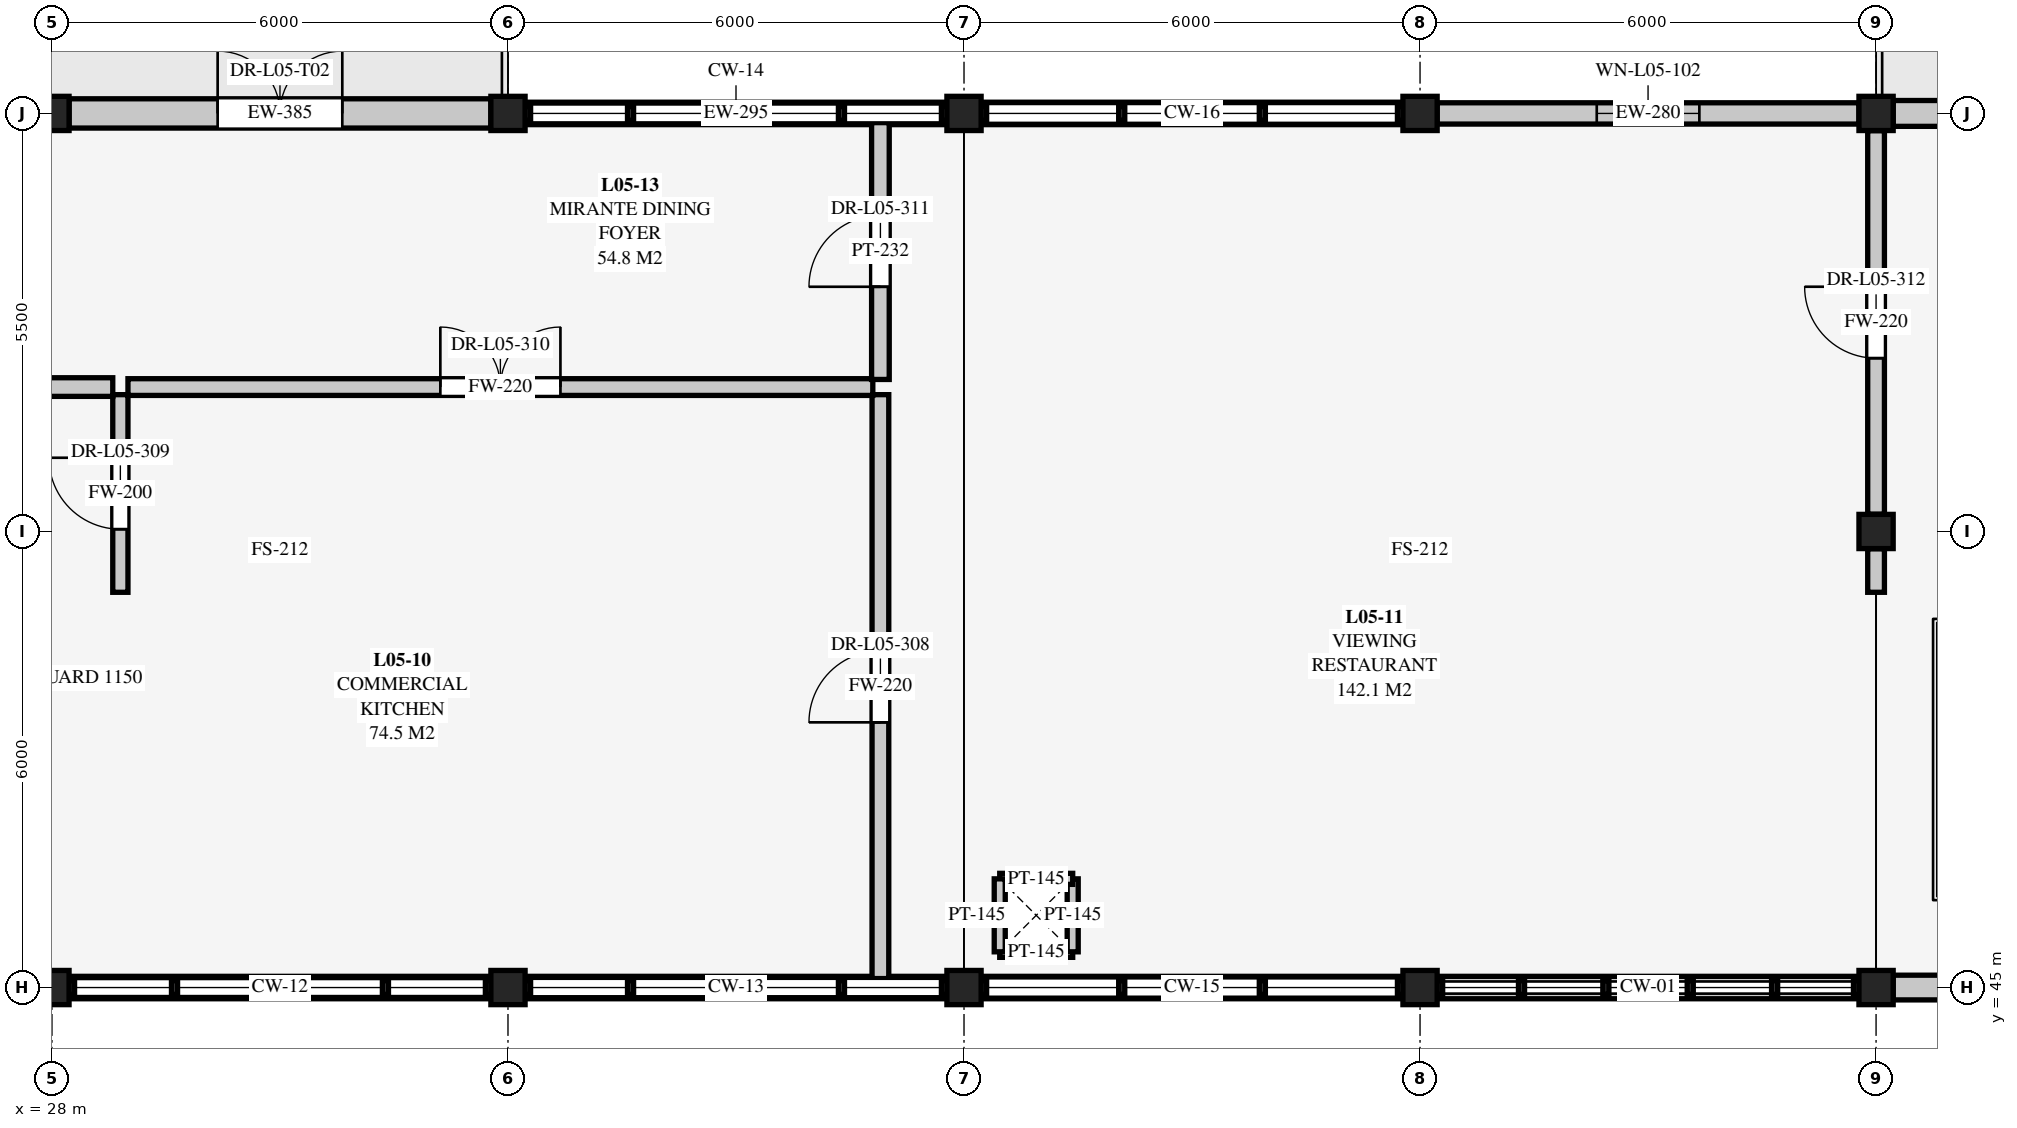
"""IFC4 building model, lengths in metres.
Left out: names, types, materials, properties, quantities, classifications, styles, units other than length and angle.
Written with IfcOpenShell. Run it as: python <this file> out.ifc"""

import sys

from ifc_helpers import new_model, si_unit, direction, frame, frame_2d, origin, origin_2d, place, context, subcontext, project, spatial, rectangle, extrude, element, fill, save


model = new_model("IFC4")
c1 = context("Model", 3, precision=1e-05, world=origin(), true_north=direction((0.0, 1.0)))
c2 = subcontext(c1, "Body", "Model", "MODEL_VIEW")
j1 = project(units=[si_unit("LENGTHUNIT", "METRE"), si_unit("PLANEANGLEUNIT", "RADIAN")], contexts=[c1])
p1 = place(None, origin())
s1 = spatial("IfcSite", under=j1, at=p1, CompositionType="ELEMENT")
p2 = place(p1, origin())
s2 = spatial("IfcBuilding", under=s1, at=p2, CompositionType="ELEMENT")
p3 = place(p2, frame((0.0, 0.0, 18.0)))
s3 = spatial("IfcBuildingStorey", under=s2, at=p3, CompositionType="ELEMENT", Elevation=18.0)
for number, where, z_axis, x_axis in (
    (1, (28.0, 45.0, 0.0), (0.0, 0.0, 1.0), (1.0, 0.0, 0.0)),
    (2, (28.0, 56.5, 0.0), (0.0, 0.0, 1.0), (1.0, 0.0, 0.0)),
    (3, (34.0, 45.0, 0.0), (0.0, 0.0, 1.0), (1.0, 0.0, 0.0)),
    (4, (34.0, 56.5, 0.0), (0.0, 0.0, 1.0), (1.0, 0.0, 0.0)),
    (5, (40.0, 45.0, 0.0), (0.0, 0.0, 1.0), (1.0, 0.0, 0.0)),
    (6, (40.0, 56.5, 0.0), (0.0, 0.0, 1.0), (1.0, 0.0, 0.0)),
    (7, (46.0, 45.0, 0.0), (0.0, 0.0, 1.0), (1.0, 0.0, 0.0)),
    (8, (46.0, 56.5, 0.0), (0.0, 0.0, 1.0), (1.0, 0.0, 0.0)),
    (9, (52.0, 45.0, 0.0), (0.0, 0.0, 1.0), (1.0, 0.0, 0.0)),
    (10, (52.0, 51.0, 0.0), (0.0, 0.0, 1.0), (1.0, 0.0, 0.0)),
    (11, (52.0, 56.5, 0.0), (0.0, 0.0, 1.0), (1.0, 0.0, 0.0)),
):
    element("IfcColumn", number, at=place(p3, frame(where, z_axis=z_axis, x_axis=x_axis)), inside=s3, PredefinedType="COLUMN", context=c2, shape_type="SweptSolid", body=[
        extrude(rectangle(XDim=0.45, YDim=0.45, at=origin_2d()), origin(), (0.0, 0.0, 1.0), 4.5),
    ])
p4 = place(p3, frame((33.775, 45.0, 0.0), z_axis=(0.0, 0.0, 1.0), x_axis=(-1.0, 0.0, 0.0)))
e12 = element("IfcWall", 12, at=p4, inside=s3, PredefinedType="SOLIDWALL", context=c2, shape_type="SweptSolid", body=[
    extrude(rectangle(XDim=5.55, YDim=0.295, at=frame_2d((2.775, 0.0))), origin(), (0.0, 0.0, 1.0), 0.31),
])
p5 = place(p3, frame((28.225, 56.5, 0.0), z_axis=(0.0, 0.0, 1.0), x_axis=(1.0, 0.0, 0.0)))
e13 = element("IfcWall", 13, at=p5, inside=s3, PredefinedType="SOLIDWALL", context=c2, shape_type="SweptSolid", body=[
    extrude(rectangle(XDim=5.55, YDim=0.385, at=frame_2d((2.775, 0.0))), origin(), (0.0, 0.0, 1.0), 4.234),
])
p6 = place(p5, frame((1.955, 0.0, 0.0)))
e14 = element("IfcOpeningElement", 14, at=p6, cuts=e13, PredefinedType="OPENING", context=c2, shape_type="SweptSolid", body=[
    extrude(rectangle(XDim=1.64, YDim=2.22, at=frame_2d((0.82, 1.11))), frame((0.0, 0.202, 0.0), z_axis=(0.0, -1.0, 0.0), x_axis=(1.0, 0.0, 0.0)), (0.0, 0.0, 1.0), 0.405),
])
p7 = place(p3, frame((39.775, 45.0, 0.0), z_axis=(0.0, 0.0, 1.0), x_axis=(-1.0, 0.0, 0.0)))
e15 = element("IfcWall", 15, at=p7, inside=s3, PredefinedType="SOLIDWALL", context=c2, shape_type="SweptSolid", body=[
    extrude(rectangle(XDim=5.55, YDim=0.295, at=frame_2d((2.775, 0.0))), origin(), (0.0, 0.0, 1.0), 0.36),
])
p8 = place(p3, frame((34.225, 56.5, 0.0), z_axis=(0.0, 0.0, 1.0), x_axis=(1.0, 0.0, 0.0)))
e16 = element("IfcWall", 16, at=p8, inside=s3, PredefinedType="SOLIDWALL", context=c2, shape_type="SweptSolid", body=[
    extrude(rectangle(XDim=5.55, YDim=0.295, at=frame_2d((2.775, 0.0))), origin(), (0.0, 0.0, 1.0), 0.41),
])
p9 = place(p3, frame((45.775, 45.0, 0.0), z_axis=(0.0, 0.0, 1.0), x_axis=(-1.0, 0.0, 0.0)))
e17 = element("IfcWall", 17, at=p9, inside=s3, PredefinedType="SOLIDWALL", context=c2, shape_type="SweptSolid", body=[
    extrude(rectangle(XDim=5.55, YDim=0.295, at=frame_2d((2.775, 0.0))), origin(), (0.0, 0.0, 1.0), 0.46),
])
p10 = place(p3, frame((40.225, 56.5, 0.0), z_axis=(0.0, 0.0, 1.0), x_axis=(1.0, 0.0, 0.0)))
e18 = element("IfcWall", 18, at=p10, inside=s3, PredefinedType="SOLIDWALL", context=c2, shape_type="SweptSolid", body=[
    extrude(rectangle(XDim=5.55, YDim=0.295, at=frame_2d((2.775, 0.0))), origin(), (0.0, 0.0, 1.0), 0.52),
])
p11 = place(p3, frame((51.775, 45.0, 0.0), z_axis=(0.0, 0.0, 1.0), x_axis=(-1.0, 0.0, 0.0)))
e19 = element("IfcWall", 19, at=p11, inside=s3, PredefinedType="SOLIDWALL", context=c2, shape_type="SweptSolid", body=[
    extrude(rectangle(XDim=5.55, YDim=0.295, at=frame_2d((2.775, 0.0))), origin(), (0.0, 0.0, 1.0), 0.16),
])
p12 = place(p3, frame((46.225, 56.5, 0.0), z_axis=(0.0, 0.0, 1.0), x_axis=(1.0, 0.0, 0.0)))
e20 = element("IfcWall", 20, at=p12, inside=s3, PredefinedType="SOLIDWALL", context=c2, shape_type="SweptSolid", body=[
    extrude(rectangle(XDim=5.55, YDim=0.28, at=frame_2d((2.775, 0.0))), origin(), (0.0, 0.0, 1.0), 4.093),
])
p13 = place(p12, frame((2.1, 0.0, 0.8)))
e21 = element("IfcOpeningElement", 21, at=p13, cuts=e20, PredefinedType="OPENING", context=c2, shape_type="SweptSolid", body=[
    extrude(rectangle(XDim=1.35, YDim=2.15, at=frame_2d((0.675, 1.075))), frame((0.0, 0.15, 0.0), z_axis=(0.0, -1.0, 0.0), x_axis=(1.0, 0.0, 0.0)), (0.0, 0.0, 1.0), 0.3),
])
p14 = place(p3, frame((57.775, 45.0, 0.0), z_axis=(0.0, 0.0, 1.0), x_axis=(-1.0, 0.0, 0.0)))
e22 = element("IfcWall", 22, at=p14, inside=s3, PredefinedType="SOLIDWALL", context=c2, shape_type="SweptSolid", body=[
    extrude(rectangle(XDim=5.55, YDim=0.325, at=frame_2d((2.775, 0.0))), origin(), (0.0, 0.0, 1.0), 4.093),
])
p15 = place(p14, frame((2.0, 0.0, 0.75)))
e23 = element("IfcOpeningElement", 23, at=p15, cuts=e22, PredefinedType="OPENING", context=c2, shape_type="SweptSolid", body=[
    extrude(rectangle(XDim=1.55, YDim=2.25, at=frame_2d((0.775, 1.125))), frame((0.0, 0.173, 0.0), z_axis=(0.0, -1.0, 0.0), x_axis=(1.0, 0.0, 0.0)), (0.0, 0.0, 1.0), 0.345),
])
p16 = place(p3, frame((52.225, 56.5, 0.0), z_axis=(0.0, 0.0, 1.0), x_axis=(1.0, 0.0, 0.0)))
e24 = element("IfcWall", 24, at=p16, inside=s3, PredefinedType="SOLIDWALL", context=c2, shape_type="SweptSolid", body=[
    extrude(rectangle(XDim=5.55, YDim=0.34, at=frame_2d((2.775, 0.0))), origin(), (0.0, 0.0, 1.0), 4.194),
])
p17 = place(p16, frame((1.915, 0.0, 0.0)))
e25 = element("IfcOpeningElement", 25, at=p17, cuts=e24, PredefinedType="OPENING", context=c2, shape_type="SweptSolid", body=[
    extrude(rectangle(XDim=1.72, YDim=2.24, at=frame_2d((0.86, 1.12))), frame((0.0, 0.18, 0.0), z_axis=(0.0, -1.0, 0.0), x_axis=(1.0, 0.0, 0.0)), (0.0, 0.0, 1.0), 0.36),
])
for number, where, z_axis, x_axis in (
    (26, (40.47, 45.47, 0.0), (0.0, 0.0, 1.0), (1.0, 0.0, 0.0)),
    (27, (41.43, 45.47, 0.0), (0.0, 0.0, 1.0), (0.0, 1.0, 0.0)),
    (28, (41.43, 46.43, 0.0), (0.0, 0.0, 1.0), (-1.0, 0.0, 0.0)),
    (29, (40.47, 46.43, 0.0), (0.0, 0.0, 1.0), (0.0, -1.0, 0.0)),
):
    element("IfcWall", number, at=place(p3, frame(where, z_axis=z_axis, x_axis=x_axis)), inside=s3, PredefinedType="PARTITIONING", context=c2, shape_type="SweptSolid", body=[
        extrude(rectangle(XDim=0.96, YDim=0.145, at=frame_2d((0.48, 0.0))), origin(), (0.0, 0.0, 1.0), 4.24),
    ])
p18 = place(p3, frame((38.9, 45.118, 0.0), z_axis=(0.0, 0.0, 1.0), x_axis=(0.0, 1.0, 0.0)))
e30 = element("IfcWall", 30, at=p18, inside=s3, PredefinedType="SOLIDWALL", context=c2, shape_type="SweptSolid", body=[
    extrude(rectangle(XDim=7.682, YDim=0.22, at=frame_2d((3.841, 0.0))), origin(), (0.0, 0.0, 1.0), 4.24),
])
p19 = place(p18, frame((3.371, 0.0, 0.0)))
e31 = element("IfcOpeningElement", 31, at=p19, cuts=e30, PredefinedType="OPENING", context=c2, shape_type="SweptSolid", body=[
    extrude(rectangle(XDim=0.94, YDim=2.1, at=frame_2d((0.47, 1.05))), frame((0.0, 0.12, 0.0), z_axis=(0.0, -1.0, 0.0), x_axis=(1.0, 0.0, 0.0)), (0.0, 0.0, 1.0), 0.24),
])
p20 = place(p3, frame((28.9, 50.2, 0.0), z_axis=(0.0, 0.0, 1.0), x_axis=(0.0, 1.0, 0.0)))
e32 = element("IfcWall", 32, at=p20, inside=s3, PredefinedType="SOLIDWALL", context=c2, shape_type="SweptSolid", body=[
    extrude(rectangle(XDim=2.6, YDim=0.2, at=frame_2d((1.3, 0.0))), origin(), (0.0, 0.0, 1.0), 4.24),
])
p21 = place(p20, frame((0.83, 0.0, 0.0)))
e33 = element("IfcOpeningElement", 33, at=p21, cuts=e32, PredefinedType="OPENING", context=c2, shape_type="SweptSolid", body=[
    extrude(rectangle(XDim=0.94, YDim=2.1, at=frame_2d((0.47, 1.05))), frame((0.0, 0.11, 0.0), z_axis=(0.0, -1.0, 0.0), x_axis=(1.0, 0.0, 0.0)), (0.0, 0.0, 1.0), 0.22),
])
p22 = place(p3, frame((29.0, 52.9, 0.0), z_axis=(0.0, 0.0, 1.0), x_axis=(1.0, 0.0, 0.0)))
e34 = element("IfcWall", 34, at=p22, inside=s3, PredefinedType="SOLIDWALL", context=c2, shape_type="SweptSolid", body=[
    extrude(rectangle(XDim=9.8, YDim=0.22, at=frame_2d((4.9, 0.0))), origin(), (0.0, 0.0, 1.0), 4.24),
])
p23 = place(p22, frame((4.11, 0.0, 0.0)))
e35 = element("IfcOpeningElement", 35, at=p23, cuts=e34, PredefinedType="OPENING", context=c2, shape_type="SweptSolid", body=[
    extrude(rectangle(XDim=1.58, YDim=2.2, at=frame_2d((0.79, 1.1))), frame((0.0, 0.12, 0.0), z_axis=(0.0, -1.0, 0.0), x_axis=(1.0, 0.0, 0.0)), (0.0, 0.0, 1.0), 0.24),
])
p24 = place(p3, frame((38.9, 53.0, 0.0), z_axis=(0.0, 0.0, 1.0), x_axis=(0.0, 1.0, 0.0)))
e36 = element("IfcWall", 36, at=p24, inside=s3, PredefinedType="PARTITIONING", context=c2, shape_type="SweptSolid", body=[
    extrude(rectangle(XDim=3.379, YDim=0.232, at=frame_2d((1.689, 0.0))), origin(), (0.0, 0.0, 1.0), 4.24),
])
p25 = place(p24, frame((1.219, 0.0, 0.0)))
e37 = element("IfcOpeningElement", 37, at=p25, cuts=e36, PredefinedType="OPENING", context=c2, shape_type="SweptSolid", body=[
    extrude(rectangle(XDim=0.94, YDim=2.1, at=frame_2d((0.47, 1.05))), frame((0.0, 0.126, 0.0), z_axis=(0.0, -1.0, 0.0), x_axis=(1.0, 0.0, 0.0)), (0.0, 0.0, 1.0), 0.252),
])
p26 = place(p3, frame((52.0, 51.227, 0.0), z_axis=(0.0, 0.0, 1.0), x_axis=(0.0, 1.0, 0.0)))
e38 = element("IfcWall", 38, at=p26, inside=s3, PredefinedType="SOLIDWALL", context=c2, shape_type="SweptSolid", body=[
    extrude(rectangle(XDim=5.046, YDim=0.22, at=frame_2d((2.523, 0.0))), origin(), (0.0, 0.0, 1.0), 4.043),
])
p27 = place(p26, frame((2.053, 0.0, 0.0)))
e39 = element("IfcOpeningElement", 39, at=p27, cuts=e38, PredefinedType="OPENING", context=c2, shape_type="SweptSolid", body=[
    extrude(rectangle(XDim=0.94, YDim=2.1, at=frame_2d((0.47, 1.05))), frame((0.0, 0.12, 0.0), z_axis=(0.0, -1.0, 0.0), x_axis=(1.0, 0.0, 0.0)), (0.0, 0.0, 1.0), 0.24),
])
p28 = place(p3, frame((52.0, 50.2, 0.0), z_axis=(0.0, 0.0, 1.0), x_axis=(0.0, 1.0, 0.0)))
e40 = element("IfcWall", 40, at=p28, inside=s3, PredefinedType="SOLIDWALL", context=c2, shape_type="SweptSolid", body=[
    extrude(rectangle(XDim=0.573, YDim=0.22, at=frame_2d((0.287, 0.0))), origin(), (0.0, 0.0, 1.0), 3.892),
])
p29 = place(p3, frame((22.085, 52.9, 0.0), z_axis=(0.0, 0.0, 1.0), x_axis=(1.0, 0.0, 0.0)))
e41 = element("IfcWall", 41, at=p29, inside=s3, PredefinedType="PARTITIONING", context=c2, shape_type="SweptSolid", body=[
    extrude(rectangle(XDim=6.715, YDim=0.245, at=frame_2d((3.357, 0.0))), origin(), (0.0, 0.0, 1.0), 4.24),
])
p30 = place(p29, frame((2.567, 0.0, 0.0)))
e42 = element("IfcOpeningElement", 42, at=p30, cuts=e41, PredefinedType="OPENING", context=c2, shape_type="SweptSolid", body=[
    extrude(rectangle(XDim=1.58, YDim=2.2, at=frame_2d((0.79, 1.1))), frame((0.0, 0.133, 0.0), z_axis=(0.0, -1.0, 0.0), x_axis=(1.0, 0.0, 0.0)), (0.0, 0.0, 1.0), 0.265),
])
p31 = place(p6, origin())
e43 = element("IfcDoor", 43, at=p31, inside=s3, OperationType="DOUBLE_DOOR_SINGLE_SWING", PredefinedType="DOOR", context=c2, shape_type="SweptSolid", body=[
    extrude(rectangle(XDim=1.64, YDim=2.22, at=frame_2d((0.82, 1.11))), frame((0.0, 0.025, 0.0), z_axis=(0.0, -1.0, 0.0), x_axis=(1.0, 0.0, 0.0)), (0.0, 0.0, 1.0), 0.05),
])
fill(e14, e43)
p32 = place(p13, origin())
e44 = element("IfcWindow", 44, at=p32, inside=s3, PartitioningType="SINGLE_PANEL", PredefinedType="WINDOW", context=c2, shape_type="SweptSolid", body=[
    extrude(rectangle(XDim=1.35, YDim=2.15, at=frame_2d((0.675, 1.075))), frame((0.0, 0.03, 0.0), z_axis=(0.0, -1.0, 0.0), x_axis=(1.0, 0.0, 0.0)), (0.0, 0.0, 1.0), 0.06),
])
fill(e21, e44)
p33 = place(p19, origin())
e45 = element("IfcDoor", 45, at=p33, inside=s3, OperationType="SINGLE_SWING_LEFT", PredefinedType="DOOR", context=c2, shape_type="SweptSolid", body=[
    extrude(rectangle(XDim=0.94, YDim=2.1, at=frame_2d((0.47, 1.05))), frame((0.0, 0.025, 0.0), z_axis=(0.0, -1.0, 0.0), x_axis=(1.0, 0.0, 0.0)), (0.0, 0.0, 1.0), 0.05),
])
fill(e31, e45)
p34 = place(p21, origin())
e46 = element("IfcDoor", 46, at=p34, inside=s3, OperationType="SINGLE_SWING_RIGHT", PredefinedType="DOOR", context=c2, shape_type="SweptSolid", body=[
    extrude(rectangle(XDim=0.94, YDim=2.1, at=frame_2d((0.47, 1.05))), frame((0.0, 0.025, 0.0), z_axis=(0.0, -1.0, 0.0), x_axis=(1.0, 0.0, 0.0)), (0.0, 0.0, 1.0), 0.05),
])
fill(e33, e46)
p35 = place(p23, origin())
e47 = element("IfcDoor", 47, at=p35, inside=s3, OperationType="DOUBLE_DOOR_SINGLE_SWING", PredefinedType="DOOR", context=c2, shape_type="SweptSolid", body=[
    extrude(rectangle(XDim=1.58, YDim=2.2, at=frame_2d((0.79, 1.1))), frame((0.0, 0.025, 0.0), z_axis=(0.0, -1.0, 0.0), x_axis=(1.0, 0.0, 0.0)), (0.0, 0.0, 1.0), 0.05),
])
fill(e35, e47)
p36 = place(p25, origin())
e48 = element("IfcDoor", 48, at=p36, inside=s3, OperationType="SINGLE_SWING_LEFT", PredefinedType="DOOR", context=c2, shape_type="SweptSolid", body=[
    extrude(rectangle(XDim=0.94, YDim=2.1, at=frame_2d((0.47, 1.05))), frame((0.0, 0.025, 0.0), z_axis=(0.0, -1.0, 0.0), x_axis=(1.0, 0.0, 0.0)), (0.0, 0.0, 1.0), 0.05),
])
fill(e37, e48)
p37 = place(p27, origin())
e49 = element("IfcDoor", 49, at=p37, inside=s3, OperationType="SINGLE_SWING_RIGHT", PredefinedType="DOOR", context=c2, shape_type="SweptSolid", body=[
    extrude(rectangle(XDim=0.94, YDim=2.1, at=frame_2d((0.47, 1.05))), frame((0.0, 0.025, 0.0), z_axis=(0.0, -1.0, 0.0), x_axis=(1.0, 0.0, 0.0)), (0.0, 0.0, 1.0), 0.05),
])
fill(e39, e49)
save(model, sys.argv[1])
